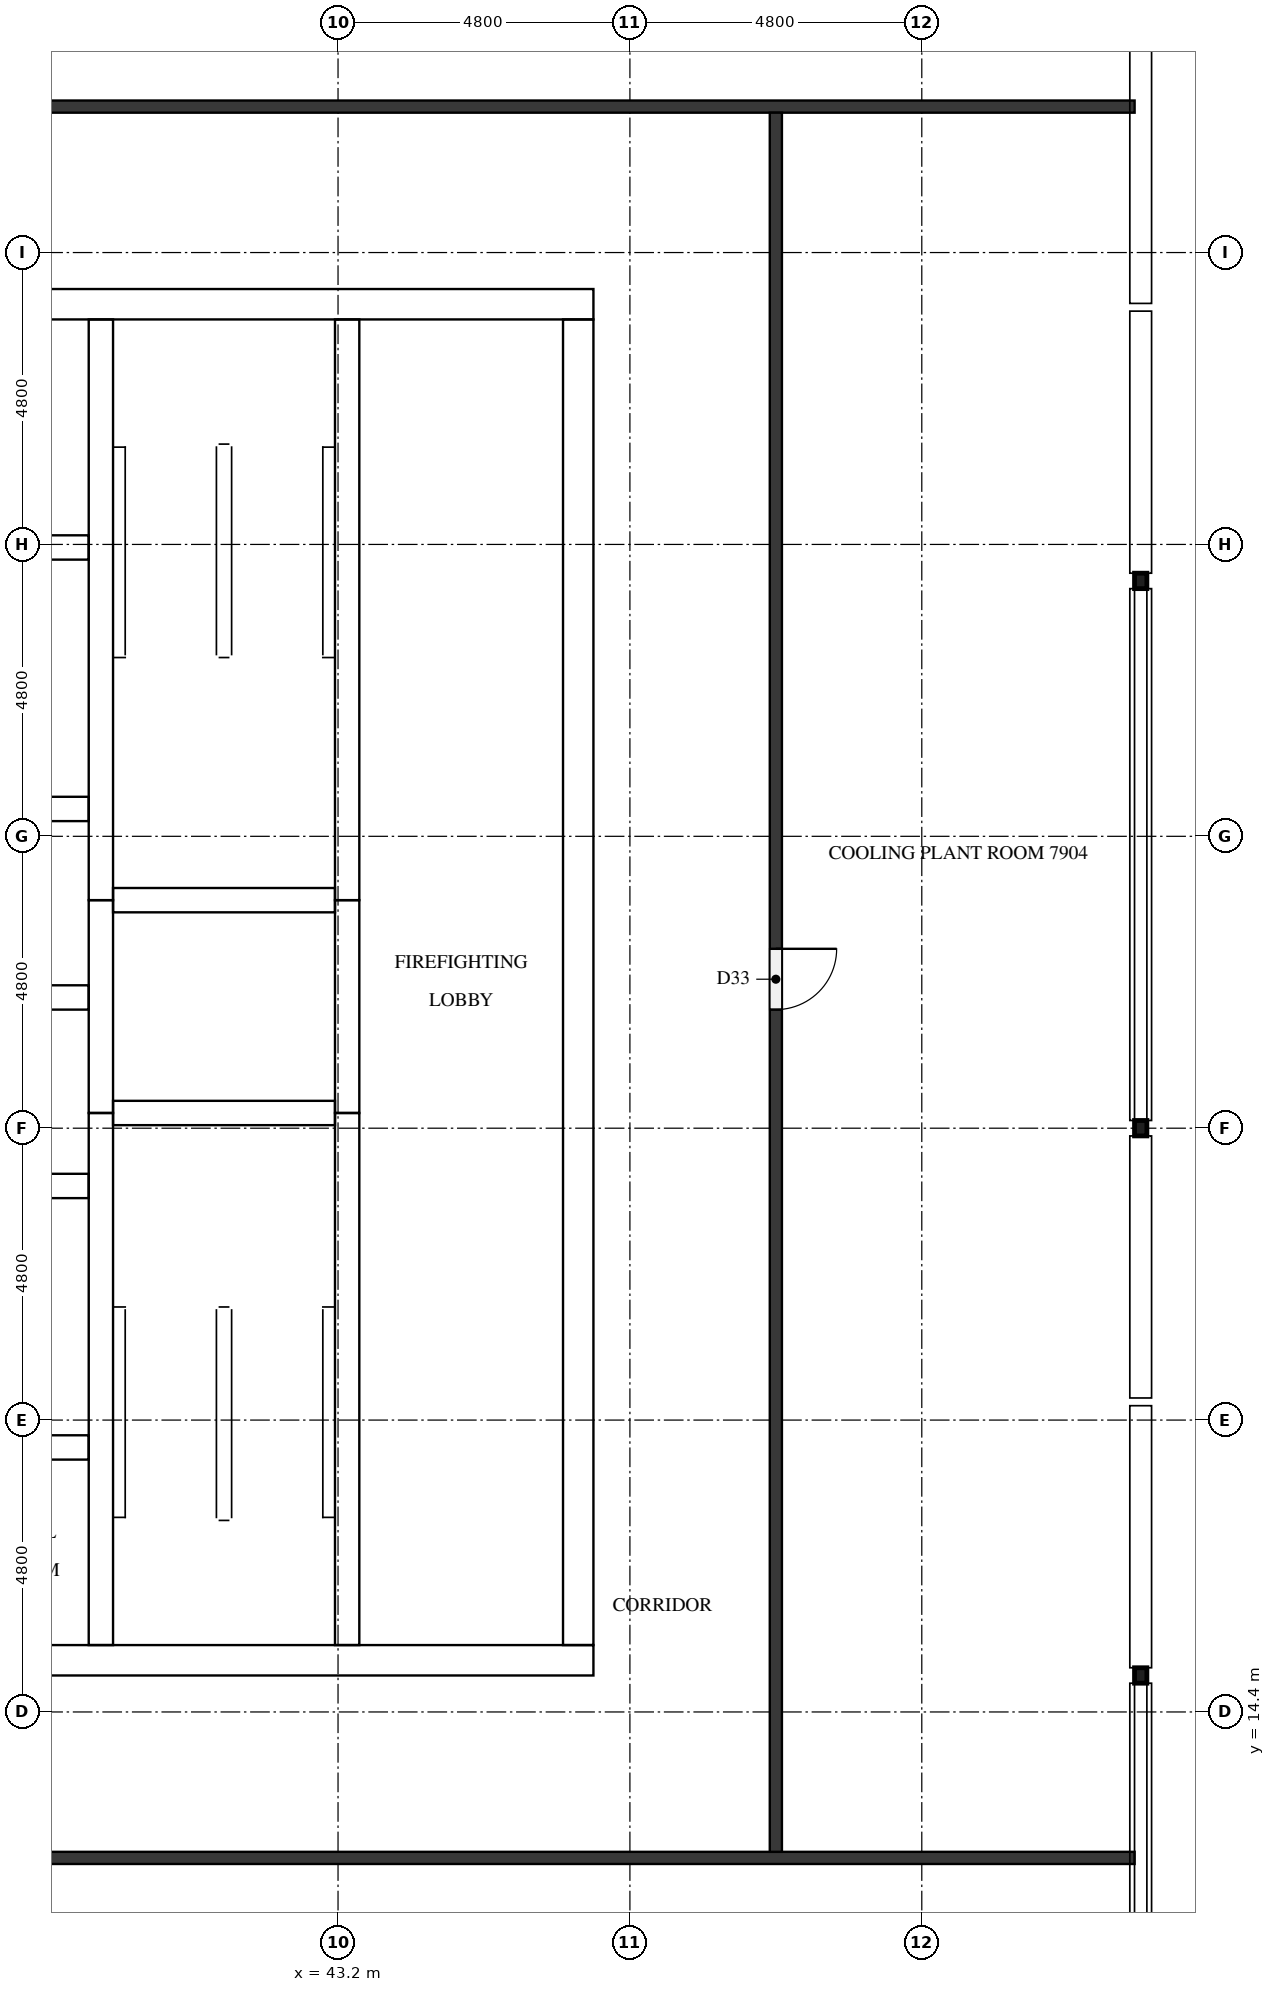
"""IFC4 building model, lengths in metres.
Left out: names, types, materials, properties, quantities, classifications, styles, units other than length and angle.
Written with IfcOpenShell. Run it as: python <this file> out.ifc"""

import sys

from ifc_helpers import new_model, si_unit, direction, frame, frame_2d, origin, origin_2d, place, context, subcontext, project, spatial, rectangle, hollow_rectangle, extrude, element, fill, save


model = new_model("IFC4")
c1 = context("Model", 3, precision=1e-05, world=origin(), true_north=direction((0.0, 1.0)))
c2 = subcontext(c1, "Body", "Model", "MODEL_VIEW")
j1 = project(units=[si_unit("LENGTHUNIT", "METRE"), si_unit("PLANEANGLEUNIT", "RADIAN")], contexts=[c1])
p1 = place(None, origin())
s1 = spatial("IfcSite", under=j1, at=p1, CompositionType="ELEMENT")
p2 = place(p1, origin())
s2 = spatial("IfcBuilding", under=s1, at=p2, CompositionType="ELEMENT")
p3 = place(p2, frame((0.0, 0.0, 305.9)))
s3 = spatial("IfcBuildingStorey", under=s2, at=p3, CompositionType="ELEMENT", Elevation=305.9)
p4 = place(p3, frame((15.0, 15.25, 0.0), z_axis=(0.0, 0.0, 1.0), x_axis=(1.0, 0.0, 0.0)))
e1 = element("IfcWall", 1, at=p4, inside=s3, PredefinedType="SHEAR", context=c2, shape_type="SweptSolid", body=[
    extrude(rectangle(XDim=32.4, YDim=0.5, at=frame_2d((16.2, 0.0))), origin(), (0.0, 0.0, 1.0), 3.8),
])
p5 = place(p4, frame((15.3, 0.0, 0.0)))
e2 = element("IfcOpeningElement", 2, at=p5, cuts=e1, PredefinedType="OPENING", context=c2, shape_type="SweptSolid", body=[
    extrude(rectangle(XDim=1.8, YDim=2.1, at=frame_2d((0.9, 1.05))), frame((0.0, 0.26, 0.0), z_axis=(0.0, -1.0, 0.0), x_axis=(1.0, 0.0, 0.0)), (0.0, 0.0, 1.0), 0.52),
])
p6 = place(p3, frame((15.0, 37.55, 0.0), z_axis=(0.0, 0.0, 1.0), x_axis=(1.0, 0.0, 0.0)))
e3 = element("IfcWall", 3, at=p6, inside=s3, PredefinedType="SHEAR", context=c2, shape_type="SweptSolid", body=[
    extrude(rectangle(XDim=32.4, YDim=0.5, at=frame_2d((16.2, 0.0))), origin(), (0.0, 0.0, 1.0), 3.8),
])
p7 = place(p6, frame((15.3, 0.0, 0.0)))
e4 = element("IfcOpeningElement", 4, at=p7, cuts=e3, PredefinedType="OPENING", context=c2, shape_type="SweptSolid", body=[
    extrude(rectangle(XDim=1.8, YDim=2.1, at=frame_2d((0.9, 1.05))), frame((0.0, 0.26, 0.0), z_axis=(0.0, -1.0, 0.0), x_axis=(1.0, 0.0, 0.0)), (0.0, 0.0, 1.0), 0.52),
])
p8 = place(p6, frame((1.282, 0.0, 0.0)))
e5 = element("IfcOpeningElement", 5, at=p8, cuts=e3, PredefinedType="OPENING", context=c2, shape_type="SweptSolid", body=[
    extrude(rectangle(XDim=1.0, YDim=2.1, at=frame_2d((0.5, 1.05))), frame((0.0, 0.26, 0.0), z_axis=(0.0, -1.0, 0.0), x_axis=(1.0, 0.0, 0.0)), (0.0, 0.0, 1.0), 0.52),
])
p9 = place(p6, frame((5.082, 0.0, 0.0)))
e6 = element("IfcOpeningElement", 6, at=p9, cuts=e3, PredefinedType="OPENING", context=c2, shape_type="SweptSolid", body=[
    extrude(rectangle(XDim=1.0, YDim=2.1, at=frame_2d((0.5, 1.05))), frame((0.0, 0.26, 0.0), z_axis=(0.0, -1.0, 0.0), x_axis=(1.0, 0.0, 0.0)), (0.0, 0.0, 1.0), 0.52),
])
p10 = place(p3, frame((47.15, 15.5, 0.0), z_axis=(0.0, 0.0, 1.0), x_axis=(0.0, 1.0, 0.0)))
e7 = element("IfcWall", 7, at=p10, inside=s3, PredefinedType="SHEAR", context=c2, shape_type="SweptSolid", body=[
    extrude(rectangle(XDim=21.8, YDim=0.5, at=frame_2d((10.9, 0.0))), origin(), (0.0, 0.0, 1.0), 3.8),
])
p11 = place(p10, frame((10.6, 0.0, 0.0)))
e8 = element("IfcOpeningElement", 8, at=p11, cuts=e7, PredefinedType="OPENING", context=c2, shape_type="SweptSolid", body=[
    extrude(rectangle(XDim=1.2, YDim=2.1, at=frame_2d((0.6, 1.05))), frame((0.0, 0.26, 0.0), z_axis=(0.0, -1.0, 0.0), x_axis=(1.0, 0.0, 0.0)), (0.0, 0.0, 1.0), 0.52),
])
p12 = place(p3, frame((39.3, 15.5, 0.0), z_axis=(0.0, 0.0, 1.0), x_axis=(0.0, 1.0, 0.0)))
e9 = element("IfcWall", 9, at=p12, inside=s3, PredefinedType="SHEAR", context=c2, shape_type="SweptSolid", body=[
    extrude(rectangle(XDim=8.75, YDim=0.4, at=frame_2d((4.375, 0.0))), origin(), (0.0, 0.0, 1.0), 3.8),
])
p13 = place(p3, frame((39.3, 24.25, 0.0), z_axis=(0.0, 0.0, 1.0), x_axis=(0.0, 1.0, 0.0)))
e10 = element("IfcWall", 10, at=p13, inside=s3, PredefinedType="SHEAR", context=c2, shape_type="SweptSolid", body=[
    extrude(rectangle(XDim=3.5, YDim=0.4, at=frame_2d((1.75, 0.0))), origin(), (0.0, 0.0, 1.0), 3.8),
])
p14 = place(p3, frame((39.3, 27.75, 0.0), z_axis=(0.0, 0.0, 1.0), x_axis=(0.0, 1.0, 0.0)))
e11 = element("IfcWall", 11, at=p14, inside=s3, PredefinedType="SHEAR", context=c2, shape_type="SweptSolid", body=[
    extrude(rectangle(XDim=9.55, YDim=0.4, at=frame_2d((4.775, 0.0))), origin(), (0.0, 0.0, 1.0), 3.8),
])
p15 = place(p3, frame((43.35, 15.5, 0.0), z_axis=(0.0, 0.0, 1.0), x_axis=(0.0, 1.0, 0.0)))
e12 = element("IfcWall", 12, at=p15, inside=s3, PredefinedType="SHEAR", context=c2, shape_type="SweptSolid", body=[
    extrude(rectangle(XDim=8.75, YDim=0.4, at=frame_2d((4.375, 0.0))), origin(), (0.0, 0.0, 1.0), 3.8),
])
p16 = place(p15, frame((0.7, 0.0, 0.0)))
e13 = element("IfcOpeningElement", 13, at=p16, cuts=e12, PredefinedType="OPENING", context=c2, shape_type="SweptSolid", body=[
    extrude(rectangle(XDim=1.2, YDim=2.1, at=frame_2d((0.6, 1.05))), frame((0.0, 0.21, 0.0), z_axis=(0.0, -1.0, 0.0), x_axis=(1.0, 0.0, 0.0)), (0.0, 0.0, 1.0), 0.42),
])
p17 = place(p3, frame((43.35, 24.25, 0.0), z_axis=(0.0, 0.0, 1.0), x_axis=(0.0, 1.0, 0.0)))
e14 = element("IfcWall", 14, at=p17, inside=s3, PredefinedType="SHEAR", context=c2, shape_type="SweptSolid", body=[
    extrude(rectangle(XDim=3.5, YDim=0.4, at=frame_2d((1.75, 0.0))), origin(), (0.0, 0.0, 1.0), 3.8),
])
p18 = place(p17, frame((1.2, 0.0, 0.0)))
e15 = element("IfcOpeningElement", 15, at=p18, cuts=e14, PredefinedType="OPENING", context=c2, shape_type="SweptSolid", body=[
    extrude(rectangle(XDim=1.1, YDim=2.1, at=frame_2d((0.55, 1.05))), frame((0.0, 0.21, 0.0), z_axis=(0.0, -1.0, 0.0), x_axis=(1.0, 0.0, 0.0)), (0.0, 0.0, 1.0), 0.42),
])
p19 = place(p3, frame((43.35, 27.75, 0.0), z_axis=(0.0, 0.0, 1.0), x_axis=(0.0, 1.0, 0.0)))
e16 = element("IfcWall", 16, at=p19, inside=s3, PredefinedType="SHEAR", context=c2, shape_type="SweptSolid", body=[
    extrude(rectangle(XDim=9.55, YDim=0.4, at=frame_2d((4.775, 0.0))), origin(), (0.0, 0.0, 1.0), 3.8),
])
p20 = place(p19, frame((7.65, 0.0, 0.0)))
e17 = element("IfcOpeningElement", 17, at=p20, cuts=e16, PredefinedType="OPENING", context=c2, shape_type="SweptSolid", body=[
    extrude(rectangle(XDim=1.2, YDim=2.1, at=frame_2d((0.6, 1.05))), frame((0.0, 0.21, 0.0), z_axis=(0.0, -1.0, 0.0), x_axis=(1.0, 0.0, 0.0)), (0.0, 0.0, 1.0), 0.42),
])
for number, where, z_axis, x_axis in (
    (18, (39.5, 24.25, 0.0), (0.0, 0.0, 1.0), (1.0, 0.0, 0.0)),
    (19, (39.5, 27.75, 0.0), (0.0, 0.0, 1.0), (1.0, 0.0, 0.0)),
):
    element("IfcWall", number, at=place(p3, frame(where, z_axis=z_axis, x_axis=x_axis)), inside=s3, PredefinedType="SHEAR", context=c2, shape_type="SweptSolid", body=[
        extrude(rectangle(XDim=3.65, YDim=0.4, at=frame_2d((1.825, 0.0))), origin(), (0.0, 0.0, 1.0), 3.8),
    ])
p21 = place(p3, frame((33.5, 18.75, 0.0), z_axis=(0.0, 0.0, 1.0), x_axis=(1.0, 0.0, 0.0)))
e20 = element("IfcWall", 20, at=p21, inside=s3, PredefinedType="SHEAR", context=c2, shape_type="SweptSolid", body=[
    extrude(rectangle(XDim=5.6, YDim=0.4, at=frame_2d((2.8, 0.0))), origin(), (0.0, 0.0, 1.0), 3.8),
])
p22 = place(p21, frame((0.89, 0.0, 0.0)))
e21 = element("IfcOpeningElement", 21, at=p22, cuts=e20, PredefinedType="OPENING", context=c2, shape_type="SweptSolid", body=[
    extrude(rectangle(XDim=1.0, YDim=2.1, at=frame_2d((0.5, 1.05))), frame((0.0, 0.21, 0.0), z_axis=(0.0, -1.0, 0.0), x_axis=(1.0, 0.0, 0.0)), (0.0, 0.0, 1.0), 0.42),
])
p23 = place(p21, frame((3.59, 0.0, 0.0)))
e22 = element("IfcOpeningElement", 22, at=p23, cuts=e20, PredefinedType="OPENING", context=c2, shape_type="SweptSolid", body=[
    extrude(rectangle(XDim=1.0, YDim=2.1, at=frame_2d((0.5, 1.05))), frame((0.0, 0.21, 0.0), z_axis=(0.0, -1.0, 0.0), x_axis=(1.0, 0.0, 0.0)), (0.0, 0.0, 1.0), 0.42),
])
p24 = place(p3, frame((23.3, 23.05, 0.0), z_axis=(0.0, 0.0, 1.0), x_axis=(1.0, 0.0, 0.0)))
e23 = element("IfcWall", 23, at=p24, inside=s3, PredefinedType="SHEAR", context=c2, shape_type="SweptSolid", body=[
    extrude(rectangle(XDim=15.8, YDim=0.4, at=frame_2d((7.9, 0.0))), origin(), (0.0, 0.0, 1.0), 3.8),
])
p25 = place(p24, frame((2.32, 0.0, 0.0)))
e24 = element("IfcOpeningElement", 24, at=p25, cuts=e23, PredefinedType="OPENING", context=c2, shape_type="SweptSolid", body=[
    extrude(rectangle(XDim=1.0, YDim=2.1, at=frame_2d((0.5, 1.05))), frame((0.0, 0.21, 0.0), z_axis=(0.0, -1.0, 0.0), x_axis=(1.0, 0.0, 0.0)), (0.0, 0.0, 1.0), 0.42),
])
p26 = place(p24, frame((6.926, 0.0, 0.0)))
e25 = element("IfcOpeningElement", 25, at=p26, cuts=e23, PredefinedType="OPENING", context=c2, shape_type="SweptSolid", body=[
    extrude(rectangle(XDim=1.0, YDim=2.1, at=frame_2d((0.5, 1.05))), frame((0.0, 0.21, 0.0), z_axis=(0.0, -1.0, 0.0), x_axis=(1.0, 0.0, 0.0)), (0.0, 0.0, 1.0), 0.42),
])
p27 = place(p24, frame((12.006, 0.0, 0.0)))
e26 = element("IfcOpeningElement", 26, at=p27, cuts=e23, PredefinedType="OPENING", context=c2, shape_type="SweptSolid", body=[
    extrude(rectangle(XDim=1.0, YDim=2.1, at=frame_2d((0.5, 1.05))), frame((0.0, 0.21, 0.0), z_axis=(0.0, -1.0, 0.0), x_axis=(1.0, 0.0, 0.0)), (0.0, 0.0, 1.0), 0.42),
])
p28 = place(p3, frame((23.3, 26.15, 0.0), z_axis=(0.0, 0.0, 1.0), x_axis=(1.0, 0.0, 0.0)))
e27 = element("IfcWall", 27, at=p28, inside=s3, PredefinedType="SHEAR", context=c2, shape_type="SweptSolid", body=[
    extrude(rectangle(XDim=15.8, YDim=0.4, at=frame_2d((7.9, 0.0))), origin(), (0.0, 0.0, 1.0), 3.8),
])
p29 = place(p3, frame((23.3, 29.25, 0.0), z_axis=(0.0, 0.0, 1.0), x_axis=(1.0, 0.0, 0.0)))
e28 = element("IfcWall", 28, at=p29, inside=s3, PredefinedType="SHEAR", context=c2, shape_type="SweptSolid", body=[
    extrude(rectangle(XDim=15.8, YDim=0.4, at=frame_2d((7.9, 0.0))), origin(), (0.0, 0.0, 1.0), 3.8),
])
p30 = place(p29, frame((2.32, 0.0, 0.0)))
e29 = element("IfcOpeningElement", 29, at=p30, cuts=e28, PredefinedType="OPENING", context=c2, shape_type="SweptSolid", body=[
    extrude(rectangle(XDim=1.0, YDim=2.1, at=frame_2d((0.5, 1.05))), frame((0.0, 0.21, 0.0), z_axis=(0.0, -1.0, 0.0), x_axis=(1.0, 0.0, 0.0)), (0.0, 0.0, 1.0), 0.42),
])
p31 = place(p29, frame((6.926, 0.0, 0.0)))
e30 = element("IfcOpeningElement", 30, at=p31, cuts=e28, PredefinedType="OPENING", context=c2, shape_type="SweptSolid", body=[
    extrude(rectangle(XDim=1.0, YDim=2.1, at=frame_2d((0.5, 1.05))), frame((0.0, 0.21, 0.0), z_axis=(0.0, -1.0, 0.0), x_axis=(1.0, 0.0, 0.0)), (0.0, 0.0, 1.0), 0.42),
])
p32 = place(p29, frame((12.006, 0.0, 0.0)))
e31 = element("IfcOpeningElement", 31, at=p32, cuts=e28, PredefinedType="OPENING", context=c2, shape_type="SweptSolid", body=[
    extrude(rectangle(XDim=1.0, YDim=2.1, at=frame_2d((0.5, 1.05))), frame((0.0, 0.21, 0.0), z_axis=(0.0, -1.0, 0.0), x_axis=(1.0, 0.0, 0.0)), (0.0, 0.0, 1.0), 0.42),
])
p33 = place(p3, frame((33.5, 33.55, 0.0), z_axis=(0.0, 0.0, 1.0), x_axis=(1.0, 0.0, 0.0)))
e32 = element("IfcWall", 32, at=p33, inside=s3, PredefinedType="SHEAR", context=c2, shape_type="SweptSolid", body=[
    extrude(rectangle(XDim=5.6, YDim=0.4, at=frame_2d((2.8, 0.0))), origin(), (0.0, 0.0, 1.0), 3.8),
])
p34 = place(p33, frame((0.578, 0.0, 0.0)))
e33 = element("IfcOpeningElement", 33, at=p34, cuts=e32, PredefinedType="OPENING", context=c2, shape_type="SweptSolid", body=[
    extrude(rectangle(XDim=1.0, YDim=2.1, at=frame_2d((0.5, 1.05))), frame((0.0, 0.21, 0.0), z_axis=(0.0, -1.0, 0.0), x_axis=(1.0, 0.0, 0.0)), (0.0, 0.0, 1.0), 0.42),
])
p35 = place(p33, frame((3.278, 0.0, 0.0)))
e34 = element("IfcOpeningElement", 34, at=p35, cuts=e32, PredefinedType="OPENING", context=c2, shape_type="SweptSolid", body=[
    extrude(rectangle(XDim=1.0, YDim=2.1, at=frame_2d((0.5, 1.05))), frame((0.0, 0.21, 0.0), z_axis=(0.0, -1.0, 0.0), x_axis=(1.0, 0.0, 0.0)), (0.0, 0.0, 1.0), 0.42),
])
for number, where, z_axis, x_axis in (
    (35, (56.4, 15.0, 0.0), (0.0, 0.0, 1.0), (1.0, 0.0, 0.0)),
    (36, (56.4, 24.0, 0.0), (0.0, 0.0, 1.0), (1.0, 0.0, 0.0)),
    (37, (56.4, 33.0, 0.0), (0.0, 0.0, 1.0), (1.0, 0.0, 0.0)),
):
    element("IfcColumn", number, at=place(p3, frame(where, z_axis=z_axis, x_axis=x_axis)), inside=s3, PredefinedType="COLUMN", context=c2, shape_type="SweptSolid", body=[
        extrude(hollow_rectangle(XDim=0.203, YDim=0.254, WallThickness=0.01, InnerFilletRadius=0.004, OuterFilletRadius=0.013, at=origin_2d()), origin(), (0.0, 0.0, 1.0), 3.8),
    ])
p36 = place(p3, frame((56.3, 12.0, 0.0), z_axis=(0.0, 0.0, 1.0), x_axis=(-1.0, 0.0, 0.0)))
e38 = element("IfcWall", 38, at=p36, inside=s3, PredefinedType="PARTITIONING", context=c2, shape_type="SweptSolid", body=[
    extrude(rectangle(XDim=55.0, YDim=0.2, at=frame_2d((27.5, 0.0))), origin(), (0.0, 0.0, 1.0), 3.8),
])
p37 = place(p36, frame((24.55, 0.0, 0.0)))
e39 = element("IfcOpeningElement", 39, at=p37, cuts=e38, PredefinedType="OPENING", context=c2, shape_type="SweptSolid", body=[
    extrude(rectangle(XDim=1.0, YDim=2.1, at=frame_2d((0.5, 1.05))), frame((0.0, 0.11, 0.0), z_axis=(0.0, -1.0, 0.0), x_axis=(1.0, 0.0, 0.0)), (0.0, 0.0, 1.0), 0.22),
])
p38 = place(p3, frame((1.3, 40.8, 0.0), z_axis=(0.0, 0.0, 1.0), x_axis=(1.0, 0.0, 0.0)))
e40 = element("IfcWall", 40, at=p38, inside=s3, PredefinedType="PARTITIONING", context=c2, shape_type="SweptSolid", body=[
    extrude(rectangle(XDim=55.0, YDim=0.2, at=frame_2d((27.5, 0.0))), origin(), (0.0, 0.0, 1.0), 3.8),
])
p39 = place(p38, frame((29.35, 0.0, 0.0)))
e41 = element("IfcOpeningElement", 41, at=p39, cuts=e40, PredefinedType="OPENING", context=c2, shape_type="SweptSolid", body=[
    extrude(rectangle(XDim=1.0, YDim=2.1, at=frame_2d((0.5, 1.05))), frame((0.0, 0.11, 0.0), z_axis=(0.0, -1.0, 0.0), x_axis=(1.0, 0.0, 0.0)), (0.0, 0.0, 1.0), 0.22),
])
p40 = place(p3, frame((50.4, 40.7, 0.0), z_axis=(0.0, 0.0, 1.0), x_axis=(0.0, -1.0, 0.0)))
e42 = element("IfcWall", 42, at=p40, inside=s3, PredefinedType="PARTITIONING", context=c2, shape_type="SweptSolid", body=[
    extrude(rectangle(XDim=28.6, YDim=0.2, at=frame_2d((14.3, 0.0))), origin(), (0.0, 0.0, 1.0), 3.8),
])
p41 = place(p40, frame((13.75, 0.0, 0.0)))
e43 = element("IfcOpeningElement", 43, at=p41, cuts=e42, PredefinedType="OPENING", context=c2, shape_type="SweptSolid", body=[
    extrude(rectangle(XDim=1.0, YDim=2.1, at=frame_2d((0.5, 1.05))), frame((0.0, 0.11, 0.0), z_axis=(0.0, -1.0, 0.0), x_axis=(1.0, 0.0, 0.0)), (0.0, 0.0, 1.0), 0.22),
])
p42 = place(p18, origin())
e44 = element("IfcDoor", 44, at=p42, inside=s3, OperationType="DOUBLE_DOOR_SLIDING", PredefinedType="DOOR", context=c2, shape_type="SweptSolid", body=[
    extrude(rectangle(XDim=1.1, YDim=2.1, at=frame_2d((0.55, 1.05))), frame((0.0, 0.025, 0.0), z_axis=(0.0, -1.0, 0.0), x_axis=(1.0, 0.0, 0.0)), (0.0, 0.0, 1.0), 0.05),
])
fill(e15, e44)
p43 = place(p16, origin())
e45 = element("IfcDoor", 45, at=p43, inside=s3, OperationType="SINGLE_SWING_RIGHT", PredefinedType="DOOR", context=c2, shape_type="SweptSolid", body=[
    extrude(rectangle(XDim=1.2, YDim=2.1, at=frame_2d((0.6, 1.05))), frame((0.0, 0.025, 0.0), z_axis=(0.0, -1.0, 0.0), x_axis=(1.0, 0.0, 0.0)), (0.0, 0.0, 1.0), 0.05),
])
fill(e13, e45)
p44 = place(p20, origin())
e46 = element("IfcDoor", 46, at=p44, inside=s3, OperationType="SINGLE_SWING_LEFT", PredefinedType="DOOR", context=c2, shape_type="SweptSolid", body=[
    extrude(rectangle(XDim=1.2, YDim=2.1, at=frame_2d((0.6, 1.05))), frame((0.0, 0.025, 0.0), z_axis=(0.0, -1.0, 0.0), x_axis=(1.0, 0.0, 0.0)), (0.0, 0.0, 1.0), 0.05),
])
fill(e17, e46)
p45 = place(p11, origin())
e47 = element("IfcDoor", 47, at=p45, inside=s3, OperationType="SINGLE_SWING_LEFT", PredefinedType="DOOR", context=c2, shape_type="SweptSolid", body=[
    extrude(rectangle(XDim=1.2, YDim=2.1, at=frame_2d((0.6, 1.05))), frame((0.0, 0.025, 0.0), z_axis=(0.0, -1.0, 0.0), x_axis=(1.0, 0.0, 0.0)), (0.0, 0.0, 1.0), 0.05),
])
fill(e8, e47)
p46 = place(p41, origin())
e48 = element("IfcDoor", 48, at=p46, inside=s3, OperationType="SINGLE_SWING_LEFT", PredefinedType="DOOR", context=c2, shape_type="SweptSolid", body=[
    extrude(rectangle(XDim=1.0, YDim=2.1, at=frame_2d((0.5, 1.05))), frame((0.0, 0.025, 0.0), z_axis=(0.0, -1.0, 0.0), x_axis=(1.0, 0.0, 0.0)), (0.0, 0.0, 1.0), 0.05),
])
fill(e43, e48)
save(model, sys.argv[1])
